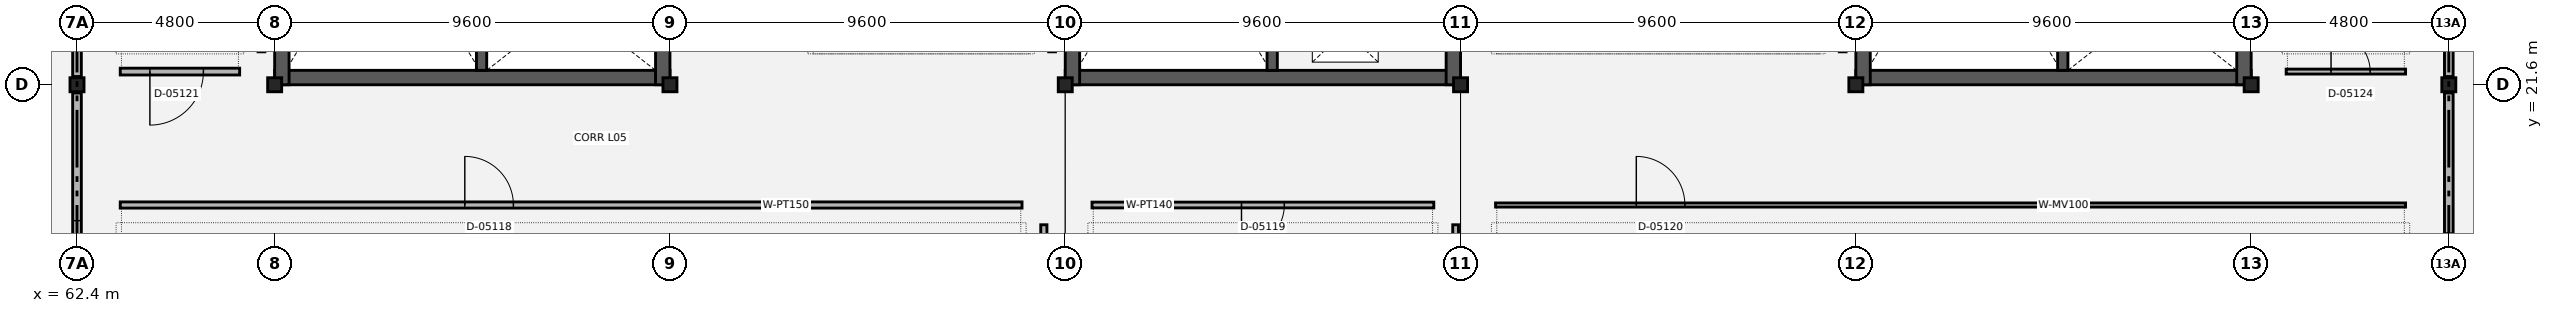
"""IFC4 building model, lengths in metres.
Left out: names, types, materials, properties, quantities, classifications, styles, units other than length and angle.
Written with IfcOpenShell. Run it as: python <this file> out.ifc"""

import sys

from ifc_helpers import new_model, si_unit, direction, frame, frame_2d, origin, origin_2d, place, context, subcontext, project, spatial, rectangle, extrude, element, fill, save


model = new_model("IFC4")
c1 = context("Model", 3, precision=1e-05, world=origin(), true_north=direction((0.0, 1.0)))
c2 = subcontext(c1, "Body", "Model", "MODEL_VIEW")
j1 = project(units=[si_unit("LENGTHUNIT", "METRE"), si_unit("PLANEANGLEUNIT", "RADIAN")], contexts=[c1])
p1 = place(None, origin())
s1 = spatial("IfcSite", under=j1, at=p1, CompositionType="ELEMENT")
p2 = place(p1, origin())
s2 = spatial("IfcBuilding", under=s1, at=p2, CompositionType="ELEMENT")
p3 = place(p2, frame((0.0, 0.0, 22.8)))
s3 = spatial("IfcBuildingStorey", under=s2, at=p3, CompositionType="ELEMENT", Elevation=22.8)
for number, where, z_axis, x_axis in (
    (1, (62.4, 21.6, 0.0), (0.0, 0.0, 1.0), (1.0, 0.0, 0.0)),
    (2, (67.2, 21.6, 0.0), (0.0, 0.0, 1.0), (1.0, 0.0, 0.0)),
    (3, (76.8, 21.6, 0.0), (0.0, 0.0, 1.0), (1.0, 0.0, 0.0)),
    (4, (86.4, 21.6, 0.0), (0.0, 0.0, 1.0), (1.0, 0.0, 0.0)),
    (5, (96.0, 21.6, 0.0), (0.0, 0.0, 1.0), (1.0, 0.0, 0.0)),
    (6, (105.6, 21.6, 0.0), (0.0, 0.0, 1.0), (1.0, 0.0, 0.0)),
    (7, (115.2, 21.6, 0.0), (0.0, 0.0, 1.0), (1.0, 0.0, 0.0)),
    (8, (120.0, 21.6, 0.0), (0.0, 0.0, 1.0), (1.0, 0.0, 0.0)),
):
    element("IfcColumn", number, at=place(p3, frame(where, z_axis=z_axis, x_axis=x_axis)), inside=s3, PredefinedType="COLUMN", context=c2, shape_type="SweptSolid", body=[
        extrude(rectangle(XDim=0.34, YDim=0.34, at=origin_2d()), origin(), (0.0, 0.0, 1.0), 4.2),
    ])
p4 = place(p3, frame((62.4, 29.8, 0.0), z_axis=(0.0, 0.0, 1.0), x_axis=(0.0, -1.0, 0.0)))
e9 = element("IfcWall", 9, at=p4, inside=s3, PredefinedType="SOLIDWALL", context=c2, shape_type="SweptSolid", body=[
    extrude(rectangle(XDim=8.0, YDim=0.21, at=frame_2d((4.0, 0.0))), origin(), (0.0, 0.0, 1.0), 3.07),
])
p5 = place(p4, frame((3.4, 0.0, 0.0)))
e10 = element("IfcOpeningElement", 10, at=p5, cuts=e9, PredefinedType="OPENING", context=c2, shape_type="SweptSolid", body=[
    extrude(rectangle(XDim=1.2, YDim=2.15, at=frame_2d((0.6, 1.075))), frame((0.0, 0.115, 0.0), z_axis=(0.0, -1.0, 0.0), x_axis=(1.0, 0.0, 0.0)), (0.0, 0.0, 1.0), 0.23),
])
p6 = place(p3, frame((62.4, 21.4, 0.0), z_axis=(0.0, 0.0, 1.0), x_axis=(0.0, -1.0, 0.0)))
e11 = element("IfcWall", 11, at=p6, inside=s3, PredefinedType="SOLIDWALL", context=c2, shape_type="SweptSolid", body=[
    extrude(rectangle(XDim=8.0, YDim=0.21, at=frame_2d((4.0, 0.0))), origin(), (0.0, 0.0, 1.0), 3.07),
])
p7 = place(p6, frame((3.1, 0.0, 0.9)))
e12 = element("IfcOpeningElement", 12, at=p7, cuts=e11, PredefinedType="OPENING", context=c2, shape_type="SweptSolid", body=[
    extrude(rectangle(XDim=1.8, YDim=1.5, at=frame_2d((0.9, 0.75))), frame((0.0, 0.115, 0.0), z_axis=(0.0, -1.0, 0.0), x_axis=(1.0, 0.0, 0.0)), (0.0, 0.0, 1.0), 0.23),
])
p8 = place(p3, frame((120.0, 13.4, 0.0), z_axis=(0.0, 0.0, 1.0), x_axis=(0.0, 1.0, 0.0)))
e13 = element("IfcWall", 13, at=p8, inside=s3, PredefinedType="SOLIDWALL", context=c2, shape_type="SweptSolid", body=[
    extrude(rectangle(XDim=8.0, YDim=0.21, at=frame_2d((4.0, 0.0))), origin(), (0.0, 0.0, 1.0), 3.07),
])
p9 = place(p8, frame((3.4, 0.0, 0.0)))
e14 = element("IfcOpeningElement", 14, at=p9, cuts=e13, PredefinedType="OPENING", context=c2, shape_type="SweptSolid", body=[
    extrude(rectangle(XDim=1.2, YDim=2.15, at=frame_2d((0.6, 1.075))), frame((0.0, 0.115, 0.0), z_axis=(0.0, -1.0, 0.0), x_axis=(1.0, 0.0, 0.0)), (0.0, 0.0, 1.0), 0.23),
])
p10 = place(p3, frame((120.0, 21.8, 0.0), z_axis=(0.0, 0.0, 1.0), x_axis=(0.0, 1.0, 0.0)))
e15 = element("IfcWall", 15, at=p10, inside=s3, PredefinedType="SOLIDWALL", context=c2, shape_type="SweptSolid", body=[
    extrude(rectangle(XDim=8.0, YDim=0.21, at=frame_2d((4.0, 0.0))), origin(), (0.0, 0.0, 1.0), 3.07),
])
p11 = place(p10, frame((3.1, 0.0, 0.9)))
e16 = element("IfcOpeningElement", 16, at=p11, cuts=e15, PredefinedType="OPENING", context=c2, shape_type="SweptSolid", body=[
    extrude(rectangle(XDim=1.8, YDim=1.5, at=frame_2d((0.9, 0.75))), frame((0.0, 0.115, 0.0), z_axis=(0.0, -1.0, 0.0), x_axis=(1.0, 0.0, 0.0)), (0.0, 0.0, 1.0), 0.23),
])
p12 = place(p3, frame((67.2, 21.775, 0.0), z_axis=(0.0, 0.0, 1.0), x_axis=(1.0, 0.0, 0.0)))
e17 = element("IfcWall", 17, at=p12, inside=s3, PredefinedType="SHEAR", context=c2, shape_type="SweptSolid", body=[
    extrude(rectangle(XDim=9.6, YDim=0.35, at=frame_2d((4.8, 0.0))), origin(), (0.0, 0.0, 1.0), 3.97),
])
p13 = place(p3, frame((67.375, 21.6, 0.0), z_axis=(0.0, 0.0, 1.0), x_axis=(0.0, 1.0, 0.0)))
e18 = element("IfcWall", 18, at=p13, inside=s3, PredefinedType="SHEAR", context=c2, shape_type="SweptSolid", body=[
    extrude(rectangle(XDim=8.4, YDim=0.35, at=frame_2d((4.2, 0.0))), origin(), (0.0, 0.0, 1.0), 3.97),
])
p14 = place(p3, frame((76.625, 21.6, 0.0), z_axis=(0.0, 0.0, 1.0), x_axis=(0.0, 1.0, 0.0)))
e19 = element("IfcWall", 19, at=p14, inside=s3, PredefinedType="SHEAR", context=c2, shape_type="SweptSolid", body=[
    extrude(rectangle(XDim=8.4, YDim=0.35, at=frame_2d((4.2, 0.0))), origin(), (0.0, 0.0, 1.0), 3.97),
])
p15 = place(p14, frame((5.3, 0.0, 0.0)))
e20 = element("IfcOpeningElement", 20, at=p15, cuts=e19, PredefinedType="OPENING", context=c2, shape_type="SweptSolid", body=[
    extrude(rectangle(XDim=1.4, YDim=2.15, at=frame_2d((0.7, 1.075))), frame((0.0, 0.185, 0.0), z_axis=(0.0, -1.0, 0.0), x_axis=(1.0, 0.0, 0.0)), (0.0, 0.0, 1.0), 0.37),
])
p16 = place(p3, frame((72.225, 29.65, 0.0), z_axis=(0.0, 0.0, 1.0), x_axis=(0.0, -1.0, 0.0)))
e21 = element("IfcWall", 21, at=p16, inside=s3, PredefinedType="SHEAR", context=c2, shape_type="SweptSolid", body=[
    extrude(rectangle(XDim=7.7, YDim=0.25, at=frame_2d((3.85, 0.0))), origin(), (0.0, 0.0, 1.0), 3.97),
])
p17 = place(p16, frame((0.45, 0.0, 0.0)))
e22 = element("IfcOpeningElement", 22, at=p17, cuts=e21, PredefinedType="OPENING", context=c2, shape_type="SweptSolid", body=[
    extrude(rectangle(XDim=1.25, YDim=2.15, at=frame_2d((0.625, 1.075))), frame((0.0, 0.135, 0.0), z_axis=(0.0, -1.0, 0.0), x_axis=(1.0, 0.0, 0.0)), (0.0, 0.0, 1.0), 0.27),
])
p18 = place(p3, frame((105.6, 21.775, 0.0), z_axis=(0.0, 0.0, 1.0), x_axis=(1.0, 0.0, 0.0)))
e23 = element("IfcWall", 23, at=p18, inside=s3, PredefinedType="SHEAR", context=c2, shape_type="SweptSolid", body=[
    extrude(rectangle(XDim=9.6, YDim=0.35, at=frame_2d((4.8, 0.0))), origin(), (0.0, 0.0, 1.0), 3.97),
])
p19 = place(p3, frame((105.775, 21.6, 0.0), z_axis=(0.0, 0.0, 1.0), x_axis=(0.0, 1.0, 0.0)))
e24 = element("IfcWall", 24, at=p19, inside=s3, PredefinedType="SHEAR", context=c2, shape_type="SweptSolid", body=[
    extrude(rectangle(XDim=8.4, YDim=0.35, at=frame_2d((4.2, 0.0))), origin(), (0.0, 0.0, 1.0), 3.97),
])
p20 = place(p3, frame((115.025, 21.6, 0.0), z_axis=(0.0, 0.0, 1.0), x_axis=(0.0, 1.0, 0.0)))
e25 = element("IfcWall", 25, at=p20, inside=s3, PredefinedType="SHEAR", context=c2, shape_type="SweptSolid", body=[
    extrude(rectangle(XDim=8.4, YDim=0.35, at=frame_2d((4.2, 0.0))), origin(), (0.0, 0.0, 1.0), 3.97),
])
p21 = place(p20, frame((5.3, 0.0, 0.0)))
e26 = element("IfcOpeningElement", 26, at=p21, cuts=e25, PredefinedType="OPENING", context=c2, shape_type="SweptSolid", body=[
    extrude(rectangle(XDim=1.4, YDim=2.15, at=frame_2d((0.7, 1.075))), frame((0.0, 0.185, 0.0), z_axis=(0.0, -1.0, 0.0), x_axis=(1.0, 0.0, 0.0)), (0.0, 0.0, 1.0), 0.37),
])
p22 = place(p3, frame((110.625, 29.65, 0.0), z_axis=(0.0, 0.0, 1.0), x_axis=(0.0, -1.0, 0.0)))
e27 = element("IfcWall", 27, at=p22, inside=s3, PredefinedType="SHEAR", context=c2, shape_type="SweptSolid", body=[
    extrude(rectangle(XDim=7.7, YDim=0.25, at=frame_2d((3.85, 0.0))), origin(), (0.0, 0.0, 1.0), 3.97),
])
p23 = place(p22, frame((0.45, 0.0, 0.0)))
e28 = element("IfcOpeningElement", 28, at=p23, cuts=e27, PredefinedType="OPENING", context=c2, shape_type="SweptSolid", body=[
    extrude(rectangle(XDim=1.25, YDim=2.15, at=frame_2d((0.625, 1.075))), frame((0.0, 0.135, 0.0), z_axis=(0.0, -1.0, 0.0), x_axis=(1.0, 0.0, 0.0)), (0.0, 0.0, 1.0), 0.27),
])
p24 = place(p3, frame((86.4, 21.775, 0.0), z_axis=(0.0, 0.0, 1.0), x_axis=(1.0, 0.0, 0.0)))
e29 = element("IfcWall", 29, at=p24, inside=s3, PredefinedType="SHEAR", context=c2, shape_type="SweptSolid", body=[
    extrude(rectangle(XDim=9.6, YDim=0.35, at=frame_2d((4.8, 0.0))), origin(), (0.0, 0.0, 1.0), 3.97),
])
p25 = place(p3, frame((86.575, 21.6, 0.0), z_axis=(0.0, 0.0, 1.0), x_axis=(0.0, 1.0, 0.0)))
e30 = element("IfcWall", 30, at=p25, inside=s3, PredefinedType="SHEAR", context=c2, shape_type="SweptSolid", body=[
    extrude(rectangle(XDim=8.4, YDim=0.35, at=frame_2d((4.2, 0.0))), origin(), (0.0, 0.0, 1.0), 3.97),
])
p26 = place(p3, frame((95.825, 21.6, 0.0), z_axis=(0.0, 0.0, 1.0), x_axis=(0.0, 1.0, 0.0)))
e31 = element("IfcWall", 31, at=p26, inside=s3, PredefinedType="SHEAR", context=c2, shape_type="SweptSolid", body=[
    extrude(rectangle(XDim=8.4, YDim=0.35, at=frame_2d((4.2, 0.0))), origin(), (0.0, 0.0, 1.0), 3.97),
])
p27 = place(p26, frame((5.3, 0.0, 0.0)))
e32 = element("IfcOpeningElement", 32, at=p27, cuts=e31, PredefinedType="OPENING", context=c2, shape_type="SweptSolid", body=[
    extrude(rectangle(XDim=1.4, YDim=2.15, at=frame_2d((0.7, 1.075))), frame((0.0, 0.185, 0.0), z_axis=(0.0, -1.0, 0.0), x_axis=(1.0, 0.0, 0.0)), (0.0, 0.0, 1.0), 0.37),
])
p28 = place(p3, frame((91.425, 29.65, 0.0), z_axis=(0.0, 0.0, 1.0), x_axis=(0.0, -1.0, 0.0)))
e33 = element("IfcWall", 33, at=p28, inside=s3, PredefinedType="SHEAR", context=c2, shape_type="SweptSolid", body=[
    extrude(rectangle(XDim=7.7, YDim=0.25, at=frame_2d((3.85, 0.0))), origin(), (0.0, 0.0, 1.0), 3.97),
])
p29 = place(p28, frame((0.45, 0.0, 0.0)))
e34 = element("IfcOpeningElement", 34, at=p29, cuts=e33, PredefinedType="OPENING", context=c2, shape_type="SweptSolid", body=[
    extrude(rectangle(XDim=1.25, YDim=2.15, at=frame_2d((0.625, 1.075))), frame((0.0, 0.135, 0.0), z_axis=(0.0, -1.0, 0.0), x_axis=(1.0, 0.0, 0.0)), (0.0, 0.0, 1.0), 0.27),
])
p30 = place(p3, frame((63.45, 18.68, 0.0), z_axis=(0.0, 0.0, 1.0), x_axis=(1.0, 0.0, 0.0)))
e35 = element("IfcWall", 35, at=p30, inside=s3, PredefinedType="PARTITIONING", context=c2, shape_type="SweptSolid", body=[
    extrude(rectangle(XDim=21.9, YDim=0.15, at=frame_2d((10.95, 0.0))), origin(), (0.0, 0.0, 1.0), 3.05),
])
p31 = place(p30, frame((8.368, 0.0, 0.0)))
e36 = element("IfcOpeningElement", 36, at=p31, cuts=e35, PredefinedType="OPENING", context=c2, shape_type="SweptSolid", body=[
    extrude(rectangle(XDim=1.18, YDim=2.15, at=frame_2d((0.59, 1.075))), frame((0.0, 0.085, 0.0), z_axis=(0.0, -1.0, 0.0), x_axis=(1.0, 0.0, 0.0)), (0.0, 0.0, 1.0), 0.17),
])
p32 = place(p3, frame((85.88, 5.8, 0.0), z_axis=(0.0, 0.0, 1.0), x_axis=(0.0, 1.0, 0.0)))
e37 = element("IfcWall", 37, at=p32, inside=s3, PredefinedType="PARTITIONING", context=c2, shape_type="SweptSolid", body=[
    extrude(rectangle(XDim=12.4, YDim=0.15, at=frame_2d((6.2, 0.0))), origin(), (0.0, 0.0, 1.0), 3.05),
])
p33 = place(p3, frame((87.05, 18.68, 0.0), z_axis=(0.0, 0.0, 1.0), x_axis=(1.0, 0.0, 0.0)))
e38 = element("IfcWall", 38, at=p33, inside=s3, PredefinedType="PARTITIONING", context=c2, shape_type="SweptSolid", body=[
    extrude(rectangle(XDim=8.3, YDim=0.14, at=frame_2d((4.15, 0.0))), origin(), (0.0, 0.0, 1.0), 3.05),
])
p34 = place(p33, frame((3.63, 0.0, 0.0)))
e39 = element("IfcOpeningElement", 39, at=p34, cuts=e38, PredefinedType="OPENING", context=c2, shape_type="SweptSolid", body=[
    extrude(rectangle(XDim=1.04, YDim=2.15, at=frame_2d((0.52, 1.075))), frame((0.0, 0.08, 0.0), z_axis=(0.0, -1.0, 0.0), x_axis=(1.0, 0.0, 0.0)), (0.0, 0.0, 1.0), 0.16),
])
p35 = place(p3, frame((95.88, 14.2, 0.0), z_axis=(0.0, 0.0, 1.0), x_axis=(0.0, 1.0, 0.0)))
e40 = element("IfcWall", 40, at=p35, inside=s3, PredefinedType="PARTITIONING", context=c2, shape_type="SweptSolid", body=[
    extrude(rectangle(XDim=4.0, YDim=0.14, at=frame_2d((2.0, 0.0))), origin(), (0.0, 0.0, 1.0), 3.05),
])
p36 = place(p3, frame((96.85, 18.68, 0.0), z_axis=(0.0, 0.0, 1.0), x_axis=(1.0, 0.0, 0.0)))
e41 = element("IfcWall", 41, at=p36, inside=s3, PredefinedType="MOVABLE", context=c2, shape_type="SweptSolid", body=[
    extrude(rectangle(XDim=22.1, YDim=0.1, at=frame_2d((11.05, 0.0))), origin(), (0.0, 0.0, 1.0), 3.05),
])
p37 = place(p36, frame((3.418, 0.0, 0.0)))
e42 = element("IfcOpeningElement", 42, at=p37, cuts=e41, PredefinedType="OPENING", context=c2, shape_type="SweptSolid", body=[
    extrude(rectangle(XDim=1.18, YDim=2.15, at=frame_2d((0.59, 1.075))), frame((0.0, 0.06, 0.0), z_axis=(0.0, -1.0, 0.0), x_axis=(1.0, 0.0, 0.0)), (0.0, 0.0, 1.0), 0.12),
])
p38 = place(p3, frame((63.45, 21.92, 0.0), z_axis=(0.0, 0.0, 1.0), x_axis=(1.0, 0.0, 0.0)))
e43 = element("IfcWall", 43, at=p38, inside=s3, PredefinedType="PARTITIONING", context=c2, shape_type="SweptSolid", body=[
    extrude(rectangle(XDim=2.9, YDim=0.165, at=frame_2d((1.45, 0.0))), origin(), (0.0, 0.0, 1.0), 3.05),
])
p39 = place(p38, frame((0.72, 0.0, 0.0)))
e44 = element("IfcOpeningElement", 44, at=p39, cuts=e43, PredefinedType="OPENING", context=c2, shape_type="SweptSolid", body=[
    extrude(rectangle(XDim=1.3, YDim=2.15, at=frame_2d((0.65, 1.075))), frame((0.0, 0.093, 0.0), z_axis=(0.0, -1.0, 0.0), x_axis=(1.0, 0.0, 0.0)), (0.0, 0.0, 1.0), 0.185),
])
p40 = place(p3, frame((116.05, 21.92, 0.0), z_axis=(0.0, 0.0, 1.0), x_axis=(1.0, 0.0, 0.0)))
e45 = element("IfcWall", 45, at=p40, inside=s3, PredefinedType="PARTITIONING", context=c2, shape_type="SweptSolid", body=[
    extrude(rectangle(XDim=2.9, YDim=0.12, at=frame_2d((1.45, 0.0))), origin(), (0.0, 0.0, 1.0), 3.05),
])
p41 = place(p40, frame((1.09, 0.0, 0.0)))
e46 = element("IfcOpeningElement", 46, at=p41, cuts=e45, PredefinedType="OPENING", context=c2, shape_type="SweptSolid", body=[
    extrude(rectangle(XDim=0.95, YDim=2.1, at=frame_2d((0.475, 1.05))), frame((0.0, 0.07, 0.0), z_axis=(0.0, -1.0, 0.0), x_axis=(1.0, 0.0, 0.0)), (0.0, 0.0, 1.0), 0.14),
])
p42 = place(p7, origin())
e47 = element("IfcWindow", 47, at=p42, inside=s3, PartitioningType="SINGLE_PANEL", PredefinedType="WINDOW", context=c2, shape_type="SweptSolid", body=[
    extrude(rectangle(XDim=1.8, YDim=1.5, at=frame_2d((0.9, 0.75))), frame((0.0, 0.03, 0.0), z_axis=(0.0, -1.0, 0.0), x_axis=(1.0, 0.0, 0.0)), (0.0, 0.0, 1.0), 0.06),
])
fill(e12, e47)
p43 = place(p31, origin())
e48 = element("IfcDoor", 48, at=p43, inside=s3, OperationType="SINGLE_SWING_LEFT", PredefinedType="DOOR", context=c2, shape_type="SweptSolid", body=[
    extrude(rectangle(XDim=1.18, YDim=2.15, at=frame_2d((0.59, 1.075))), frame((0.0, 0.025, 0.0), z_axis=(0.0, -1.0, 0.0), x_axis=(1.0, 0.0, 0.0)), (0.0, 0.0, 1.0), 0.05),
])
fill(e36, e48)
p44 = place(p34, origin())
e49 = element("IfcDoor", 49, at=p44, inside=s3, OperationType="SINGLE_SWING_RIGHT", PredefinedType="DOOR", context=c2, shape_type="SweptSolid", body=[
    extrude(rectangle(XDim=1.04, YDim=2.15, at=frame_2d((0.52, 1.075))), frame((0.0, 0.025, 0.0), z_axis=(0.0, -1.0, 0.0), x_axis=(1.0, 0.0, 0.0)), (0.0, 0.0, 1.0), 0.05),
])
fill(e39, e49)
p45 = place(p37, origin())
e50 = element("IfcDoor", 50, at=p45, inside=s3, OperationType="SINGLE_SWING_LEFT", PredefinedType="DOOR", context=c2, shape_type="SweptSolid", body=[
    extrude(rectangle(XDim=1.18, YDim=2.15, at=frame_2d((0.59, 1.075))), frame((0.0, 0.025, 0.0), z_axis=(0.0, -1.0, 0.0), x_axis=(1.0, 0.0, 0.0)), (0.0, 0.0, 1.0), 0.05),
])
fill(e42, e50)
p46 = place(p39, origin())
e51 = element("IfcDoor", 51, at=p46, inside=s3, OperationType="SINGLE_SWING_RIGHT", PredefinedType="DOOR", context=c2, shape_type="SweptSolid", body=[
    extrude(rectangle(XDim=1.3, YDim=2.15, at=frame_2d((0.65, 1.075))), frame((0.0, 0.025, 0.0), z_axis=(0.0, -1.0, 0.0), x_axis=(1.0, 0.0, 0.0)), (0.0, 0.0, 1.0), 0.05),
])
fill(e44, e51)
p47 = place(p41, origin())
e52 = element("IfcDoor", 52, at=p47, inside=s3, OperationType="SINGLE_SWING_LEFT", PredefinedType="DOOR", context=c2, shape_type="SweptSolid", body=[
    extrude(rectangle(XDim=0.95, YDim=2.1, at=frame_2d((0.475, 1.05))), frame((0.0, 0.025, 0.0), z_axis=(0.0, -1.0, 0.0), x_axis=(1.0, 0.0, 0.0)), (0.0, 0.0, 1.0), 0.05),
])
fill(e46, e52)
save(model, sys.argv[1])
